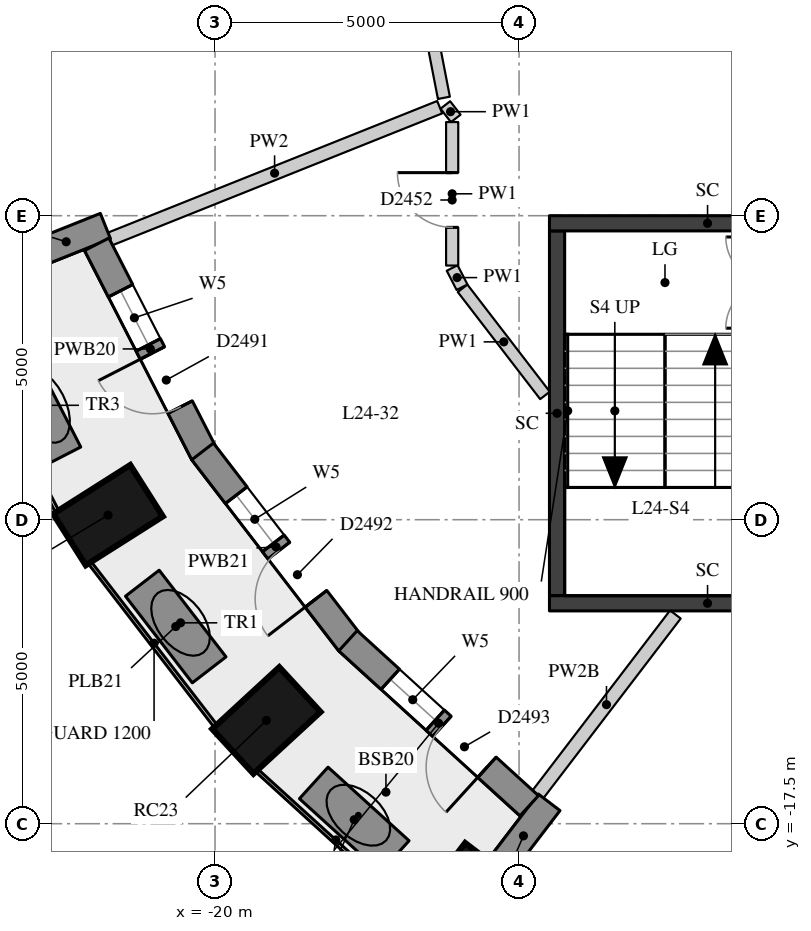
"""IFC4 building model, lengths in metres.
Left out: names, types, materials, properties, quantities, classifications, styles, units other than length and angle.
Written with IfcOpenShell. Run it as: python <this file> out.ifc"""

import sys

from ifc_helpers import new_model, si_unit, direction, frame, frame_2d, origin, origin_2d, place, context, subcontext, project, spatial, rectangle, extrude, element, fill, save


model = new_model("IFC4")
c1 = context("Model", 3, precision=1e-05, world=origin(), true_north=direction((0.0, 1.0)))
c2 = subcontext(c1, "Body", "Model", "MODEL_VIEW")
j1 = project(units=[si_unit("LENGTHUNIT", "METRE"), si_unit("PLANEANGLEUNIT", "RADIAN")], contexts=[c1])
p1 = place(None, origin())
s1 = spatial("IfcSite", under=j1, at=p1, CompositionType="ELEMENT")
p2 = place(p1, origin())
s2 = spatial("IfcBuilding", under=s1, at=p2, CompositionType="ELEMENT")
p3 = place(p2, frame((0.0, 0.0, 88.9)))
s3 = spatial("IfcBuildingStorey", under=s2, at=p3, CompositionType="ELEMENT", Elevation=88.9)
for number, where, z_axis, x_axis in (
    (1, (-21.76, -12.425, 0.0), (0.0, 0.0, 1.0), (-0.845, -0.536, 0.0)),
    (2, (-19.156, -15.802, 0.0), (0.0, 0.0, 1.0), (-0.735, -0.678, 0.0)),
    (3, (-15.945, -18.717, 0.0), (0.0, 0.0, 1.0), (-0.607, -0.795, 0.0)),
):
    element("IfcColumn", number, at=place(p3, frame(where, z_axis=z_axis, x_axis=x_axis)), inside=s3, PredefinedType="COLUMN", context=c2, shape_type="SweptSolid", body=[
        extrude(rectangle(XDim=1.5, YDim=1.0, at=origin_2d()), origin(), (0.0, 0.0, 1.0), 3.3),
    ])
p4 = place(p3, frame((-23.093, -8.187, 0.0), z_axis=(0.0, 0.0, 1.0), x_axis=(0.928549333349, 0.371209018665, 0.0)))
e4 = element("IfcWall", 4, at=p4, inside=s3, PredefinedType="SOLIDWALL", context=c2, shape_type="SweptSolid", body=[
    extrude(rectangle(XDim=1.39, YDim=0.45, at=frame_2d((0.695, 0.0))), origin(), (0.0, 0.0, 1.0), 3.02),
])
p5 = place(p3, frame((-15.35, -18.253, 0.0), z_axis=(0.0, 0.0, 1.0), x_axis=(0.607026495834, 0.794681592435, 0.0)))
e5 = element("IfcWall", 5, at=p5, inside=s3, PredefinedType="SOLIDWALL", context=c2, shape_type="SweptSolid", body=[
    extrude(rectangle(XDim=1.391, YDim=0.45, at=frame_2d((0.695, 0.0))), origin(), (0.0, 0.0, 1.0), 2.57),
])
p6 = place(p3, frame((-21.945, -7.97, 0.0), z_axis=(0.0, 0.0, 1.0), x_axis=(0.455905146579, -0.89002836883, 0.0)))
e6 = element("IfcWall", 6, at=p6, inside=s3, PredefinedType="SOLIDWALL", context=c2, shape_type="SweptSolid", body=[
    extrude(rectangle(XDim=3.867, YDim=0.45, at=frame_2d((1.934, 0.0))), origin(), (0.0, 0.0, 1.0), 3.02),
])
p7 = place(p6, frame((0.858, 0.0, 0.4)))
e7 = element("IfcOpeningElement", 7, at=p7, cuts=e6, PredefinedType="OPENING", context=c2, shape_type="SweptSolid", body=[
    extrude(rectangle(XDim=1.0, YDim=1.75, at=frame_2d((0.5, 0.875))), frame((0.0, 0.235, 0.0), z_axis=(0.0, -1.0, 0.0), x_axis=(1.0, 0.0, 0.0)), (0.0, 0.0, 1.0), 0.47),
])
p8 = place(p6, frame((2.009, 0.0, 0.0)))
e8 = element("IfcOpeningElement", 8, at=p8, cuts=e6, PredefinedType="OPENING", context=c2, shape_type="SweptSolid", body=[
    extrude(rectangle(XDim=1.0, YDim=2.15, at=frame_2d((0.5, 1.075))), frame((0.0, 0.235, 0.0), z_axis=(0.0, -1.0, 0.0), x_axis=(1.0, 0.0, 0.0)), (0.0, 0.0, 1.0), 0.47),
])
p9 = place(p3, frame((-20.204, -11.377, 0.0), z_axis=(0.0, 0.0, 1.0), x_axis=(0.609698858135, -0.792633144897, 0.0)))
e9 = element("IfcWall", 9, at=p9, inside=s3, PredefinedType="SOLIDWALL", context=c2, shape_type="SweptSolid", body=[
    extrude(rectangle(XDim=3.965, YDim=0.45, at=frame_2d((1.982, 0.0))), origin(), (0.0, 0.0, 1.0), 3.02),
])
p10 = place(p9, frame((0.907, 0.0, 0.4)))
e10 = element("IfcOpeningElement", 10, at=p10, cuts=e9, PredefinedType="OPENING", context=c2, shape_type="SweptSolid", body=[
    extrude(rectangle(XDim=1.0, YDim=1.75, at=frame_2d((0.5, 0.875))), frame((0.0, 0.235, 0.0), z_axis=(0.0, -1.0, 0.0), x_axis=(1.0, 0.0, 0.0)), (0.0, 0.0, 1.0), 0.47),
])
p11 = place(p9, frame((2.058, 0.0, 0.0)))
e11 = element("IfcOpeningElement", 11, at=p11, cuts=e9, PredefinedType="OPENING", context=c2, shape_type="SweptSolid", body=[
    extrude(rectangle(XDim=1.0, YDim=2.15, at=frame_2d((0.5, 1.075))), frame((0.0, 0.235, 0.0), z_axis=(0.0, -1.0, 0.0), x_axis=(1.0, 0.0, 0.0)), (0.0, 0.0, 1.0), 0.47),
])
p12 = place(p3, frame((-17.814, -14.491, 0.0), z_axis=(0.0, 0.0, 1.0), x_axis=(0.73951517403, -0.673139886933, 0.0)))
e12 = element("IfcWall", 12, at=p12, inside=s3, PredefinedType="SOLIDWALL", context=c2, shape_type="SweptSolid", body=[
    extrude(rectangle(XDim=4.031, YDim=0.45, at=frame_2d((2.016, 0.0))), origin(), (0.0, 0.0, 1.0), 3.02),
])
p13 = place(p12, frame((0.941, 0.0, 0.4)))
e13 = element("IfcOpeningElement", 13, at=p13, cuts=e12, PredefinedType="OPENING", context=c2, shape_type="SweptSolid", body=[
    extrude(rectangle(XDim=1.0, YDim=1.75, at=frame_2d((0.5, 0.875))), frame((0.0, 0.235, 0.0), z_axis=(0.0, -1.0, 0.0), x_axis=(1.0, 0.0, 0.0)), (0.0, 0.0, 1.0), 0.47),
])
p14 = place(p12, frame((2.091, 0.0, 0.0)))
e14 = element("IfcOpeningElement", 14, at=p14, cuts=e12, PredefinedType="OPENING", context=c2, shape_type="SweptSolid", body=[
    extrude(rectangle(XDim=1.0, YDim=2.15, at=frame_2d((0.5, 1.075))), frame((0.0, 0.235, 0.0), z_axis=(0.0, -1.0, 0.0), x_axis=(1.0, 0.0, 0.0)), (0.0, 0.0, 1.0), 0.47),
])
p15 = place(p3, frame((-23.342, -9.864, 0.0), z_axis=(0.0, 0.0, 1.0), x_axis=(0.456845298981, -0.88954616114, 0.0)))
e15 = element("IfcWall", 15, at=p15, inside=s3, PredefinedType="USERDEFINED", context=c2, shape_type="SweptSolid", body=[
    extrude(rectangle(XDim=1.8, YDim=0.7, at=frame_2d((0.9, 0.0))), origin(), (0.0, 0.0, 1.0), 0.75),
])
p16 = place(p3, frame((-21.196, -13.544, 0.0), z_axis=(0.0, 0.0, 1.0), x_axis=(0.610686846919, -0.791872196127, 0.0)))
e16 = element("IfcWall", 16, at=p16, inside=s3, PredefinedType="USERDEFINED", context=c2, shape_type="SweptSolid", body=[
    extrude(rectangle(XDim=1.8, YDim=0.7, at=frame_2d((0.9, 0.0))), origin(), (0.0, 0.0, 1.0), 0.75),
])
p17 = place(p3, frame((-18.377, -16.829, 0.0), z_axis=(0.0, 0.0, 1.0), x_axis=(0.740332755969, -0.6722405897, 0.0)))
e17 = element("IfcWall", 17, at=p17, inside=s3, PredefinedType="USERDEFINED", context=c2, shape_type="SweptSolid", body=[
    extrude(rectangle(XDim=1.8, YDim=0.7, at=frame_2d((0.9, 0.0))), origin(), (0.0, 0.0, 1.0), 0.75),
])
p18 = place(p3, frame((-14.375, -13.75, -0.28), z_axis=(0.0, 0.0, 1.0), x_axis=(0.0, 1.0, 0.0)))
e18 = element("IfcWall", 18, at=p18, inside=s3, PredefinedType="SHEAR", context=c2, shape_type="SweptSolid", body=[
    extrude(rectangle(XDim=6.0, YDim=0.25, at=frame_2d((3.0, 0.0))), origin(), (0.0, 0.0, 1.0), 3.3),
])
for number, where, z_axis, x_axis in (
    (19, (-14.5, -7.625, -0.28), (0.0, 0.0, 1.0), (1.0, 0.0, 0.0)),
    (20, (-14.5, -13.875, -0.28), (0.0, 0.0, 1.0), (1.0, 0.0, 0.0)),
):
    element("IfcWall", number, at=place(p3, frame(where, z_axis=z_axis, x_axis=x_axis)), inside=s3, PredefinedType="SHEAR", context=c2, shape_type="SweptSolid", body=[
        extrude(rectangle(XDim=5.2, YDim=0.25, at=frame_2d((2.6, 0.0))), origin(), (0.0, 0.0, 1.0), 3.3),
    ])
p19 = place(p3, frame((-14.573, -10.456, 0.0), z_axis=(0.0, 0.0, 1.0), x_axis=(-0.60967360535, 0.792652568872, 0.0)))
e21 = element("IfcWall", 21, at=p19, inside=s3, PredefinedType="PARTITIONING", context=c2, shape_type="SweptSolid", body=[
    extrude(rectangle(XDim=2.223, YDim=0.2, at=frame_2d((1.111, 0.0))), origin(), (0.0, 0.0, 1.0), 3.02),
])
p20 = place(p3, frame((-15.938, -8.676, 0.0), z_axis=(0.0, 0.0, 1.0), x_axis=(-0.456525695549, 0.889710227717, 0.0)))
e22 = element("IfcWall", 22, at=p20, inside=s3, PredefinedType="PARTITIONING", context=c2, shape_type="SweptSolid", body=[
    extrude(rectangle(XDim=0.356, YDim=0.2, at=frame_2d((0.178, 0.0))), origin(), (0.0, 0.0, 1.0), 3.02),
])
p21 = place(p3, frame((-16.1, -8.32, 0.0), z_axis=(0.0, 0.0, 1.0), x_axis=(0.0, 1.0, 0.0)))
e23 = element("IfcWall", 23, at=p21, inside=s3, PredefinedType="PARTITIONING", context=c2, shape_type="SweptSolid", body=[
    extrude(rectangle(XDim=2.36, YDim=0.2, at=frame_2d((1.18, 0.0))), origin(), (0.0, 0.0, 1.0), 3.02),
])
p22 = place(p21, frame((0.628, 0.0, 0.0)))
e24 = element("IfcOpeningElement", 24, at=p22, cuts=e23, PredefinedType="OPENING", context=c2, shape_type="SweptSolid", body=[
    extrude(rectangle(XDim=0.9, YDim=2.1, at=frame_2d((0.45, 1.05))), frame((0.0, 0.11, 0.0), z_axis=(0.0, -1.0, 0.0), x_axis=(1.0, 0.0, 0.0)), (0.0, 0.0, 1.0), 0.22),
])
p23 = place(p3, frame((-16.041, -5.9, 0.0), z_axis=(0.0, 0.0, 1.0), x_axis=(-0.612489897904, 0.790478415243, 0.0)))
e25 = element("IfcWall", 25, at=p23, inside=s3, PredefinedType="PARTITIONING", context=c2, shape_type="SweptSolid", body=[
    extrude(rectangle(XDim=0.28, YDim=0.2, at=frame_2d((0.14, 0.0))), origin(), (0.0, 0.0, 1.0), 3.02),
])
p24 = place(p3, frame((-16.236, -5.562, 0.0), z_axis=(0.0, 0.0, 1.0), x_axis=(-0.190753296708, 0.981638008532, 0.0)))
e26 = element("IfcWall", 26, at=p24, inside=s3, PredefinedType="PARTITIONING", context=c2, shape_type="SweptSolid", body=[
    extrude(rectangle(XDim=5.054, YDim=0.2, at=frame_2d((2.527, 0.0))), origin(), (0.0, 0.0, 1.0), 3.02),
])
p25 = place(p24, frame((3.528, 0.0, 0.0)))
e27 = element("IfcOpeningElement", 27, at=p25, cuts=e26, PredefinedType="OPENING", context=c2, shape_type="SweptSolid", body=[
    extrude(rectangle(XDim=1.1, YDim=2.1, at=frame_2d((0.55, 1.05))), frame((0.0, 0.11, 0.0), z_axis=(0.0, -1.0, 0.0), x_axis=(1.0, 0.0, 0.0)), (0.0, 0.0, 1.0), 0.22),
])
p26 = place(p3, frame((-21.736, -7.887, 0.0), z_axis=(0.0, 0.0, 1.0), x_axis=(0.928522746632, 0.371275516277, 0.0)))
e28 = element("IfcWall", 28, at=p26, inside=s3, PredefinedType="PARTITIONING", context=c2, shape_type="SweptSolid", body=[
    extrude(rectangle(XDim=5.848, YDim=0.22, at=frame_2d((2.924, 0.0))), origin(), (0.0, 0.0, 1.0), 3.02),
])
p27 = place(p3, frame((-14.696, -17.025, 0.0), z_axis=(0.0, 0.0, 1.0), x_axis=(0.607059278405, 0.794656550028, 0.0)))
e29 = element("IfcWall", 29, at=p27, inside=s3, PredefinedType="PARTITIONING", context=c2, shape_type="SweptSolid", body=[
    extrude(rectangle(XDim=3.734, YDim=0.22, at=frame_2d((1.867, 0.0))), origin(), (0.0, 0.0, 1.0), 2.57),
])
p28 = place(p3, frame((-8.0, -5.554, 0.0), z_axis=(0.0, 0.0, 1.0), x_axis=(-0.923860025149, 0.382730523909, 0.0)))
e30 = element("IfcWall", 30, at=p28, inside=s3, PredefinedType="PARTITIONING", context=c2, shape_type="SweptSolid", body=[
    extrude(rectangle(XDim=4.251, YDim=0.1, at=frame_2d((2.125, 0.0))), origin(), (0.0, 0.0, 1.0), 3.02),
])
p29 = place(p7, origin())
e31 = element("IfcWindow", 31, at=p29, inside=s3, PartitioningType="SINGLE_PANEL", PredefinedType="WINDOW", context=c2, shape_type="SweptSolid", body=[
    extrude(rectangle(XDim=1.0, YDim=1.75, at=frame_2d((0.5, 0.875))), frame((0.0, 0.035, 0.0), z_axis=(0.0, -1.0, 0.0), x_axis=(1.0, 0.0, 0.0)), (0.0, 0.0, 1.0), 0.06),
])
fill(e7, e31)
p30 = place(p8, frame((1.0, 0.0, 0.0), z_axis=(0.0, 0.0, 1.0), x_axis=(-1.0, 0.0, 0.0)))
e32 = element("IfcDoor", 32, at=p30, inside=s3, OperationType="SINGLE_SWING_RIGHT", PredefinedType="DOOR", context=c2, shape_type="SweptSolid", body=[
    extrude(rectangle(XDim=1.0, YDim=2.15, at=frame_2d((0.5, 1.075))), frame((0.0, 0.075, 0.0), z_axis=(0.0, -1.0, 0.0), x_axis=(1.0, 0.0, 0.0)), (0.0, 0.0, 1.0), 0.05),
])
fill(e8, e32)
p31 = place(p10, origin())
e33 = element("IfcWindow", 33, at=p31, inside=s3, PartitioningType="SINGLE_PANEL", PredefinedType="WINDOW", context=c2, shape_type="SweptSolid", body=[
    extrude(rectangle(XDim=1.0, YDim=1.75, at=frame_2d((0.5, 0.875))), frame((0.0, 0.035, 0.0), z_axis=(0.0, -1.0, 0.0), x_axis=(1.0, 0.0, 0.0)), (0.0, 0.0, 1.0), 0.06),
])
fill(e10, e33)
p32 = place(p11, frame((1.0, 0.0, 0.0), z_axis=(0.0, 0.0, 1.0), x_axis=(-1.0, 0.0, 0.0)))
e34 = element("IfcDoor", 34, at=p32, inside=s3, OperationType="SINGLE_SWING_LEFT", PredefinedType="DOOR", context=c2, shape_type="SweptSolid", body=[
    extrude(rectangle(XDim=1.0, YDim=2.15, at=frame_2d((0.5, 1.075))), frame((0.0, 0.075, 0.0), z_axis=(0.0, -1.0, 0.0), x_axis=(1.0, 0.0, 0.0)), (0.0, 0.0, 1.0), 0.05),
])
fill(e11, e34)
p33 = place(p13, origin())
e35 = element("IfcWindow", 35, at=p33, inside=s3, PartitioningType="SINGLE_PANEL", PredefinedType="WINDOW", context=c2, shape_type="SweptSolid", body=[
    extrude(rectangle(XDim=1.0, YDim=1.75, at=frame_2d((0.5, 0.875))), frame((0.0, 0.035, 0.0), z_axis=(0.0, -1.0, 0.0), x_axis=(1.0, 0.0, 0.0)), (0.0, 0.0, 1.0), 0.06),
])
fill(e13, e35)
p34 = place(p14, frame((1.0, 0.0, 0.0), z_axis=(0.0, 0.0, 1.0), x_axis=(-1.0, 0.0, 0.0)))
e36 = element("IfcDoor", 36, at=p34, inside=s3, OperationType="SINGLE_SWING_LEFT", PredefinedType="DOOR", context=c2, shape_type="SweptSolid", body=[
    extrude(rectangle(XDim=1.0, YDim=2.15, at=frame_2d((0.5, 1.075))), frame((0.0, 0.075, 0.0), z_axis=(0.0, -1.0, 0.0), x_axis=(1.0, 0.0, 0.0)), (0.0, 0.0, 1.0), 0.05),
])
fill(e14, e36)
p35 = place(p22, origin())
e37 = element("IfcDoor", 37, at=p35, inside=s3, OperationType="SINGLE_SWING_RIGHT", PredefinedType="DOOR", context=c2, shape_type="SweptSolid", body=[
    extrude(rectangle(XDim=0.9, YDim=2.1, at=frame_2d((0.45, 1.05))), frame((0.0, 0.025, 0.0), z_axis=(0.0, -1.0, 0.0), x_axis=(1.0, 0.0, 0.0)), (0.0, 0.0, 1.0), 0.05),
])
fill(e24, e37)
save(model, sys.argv[1])
